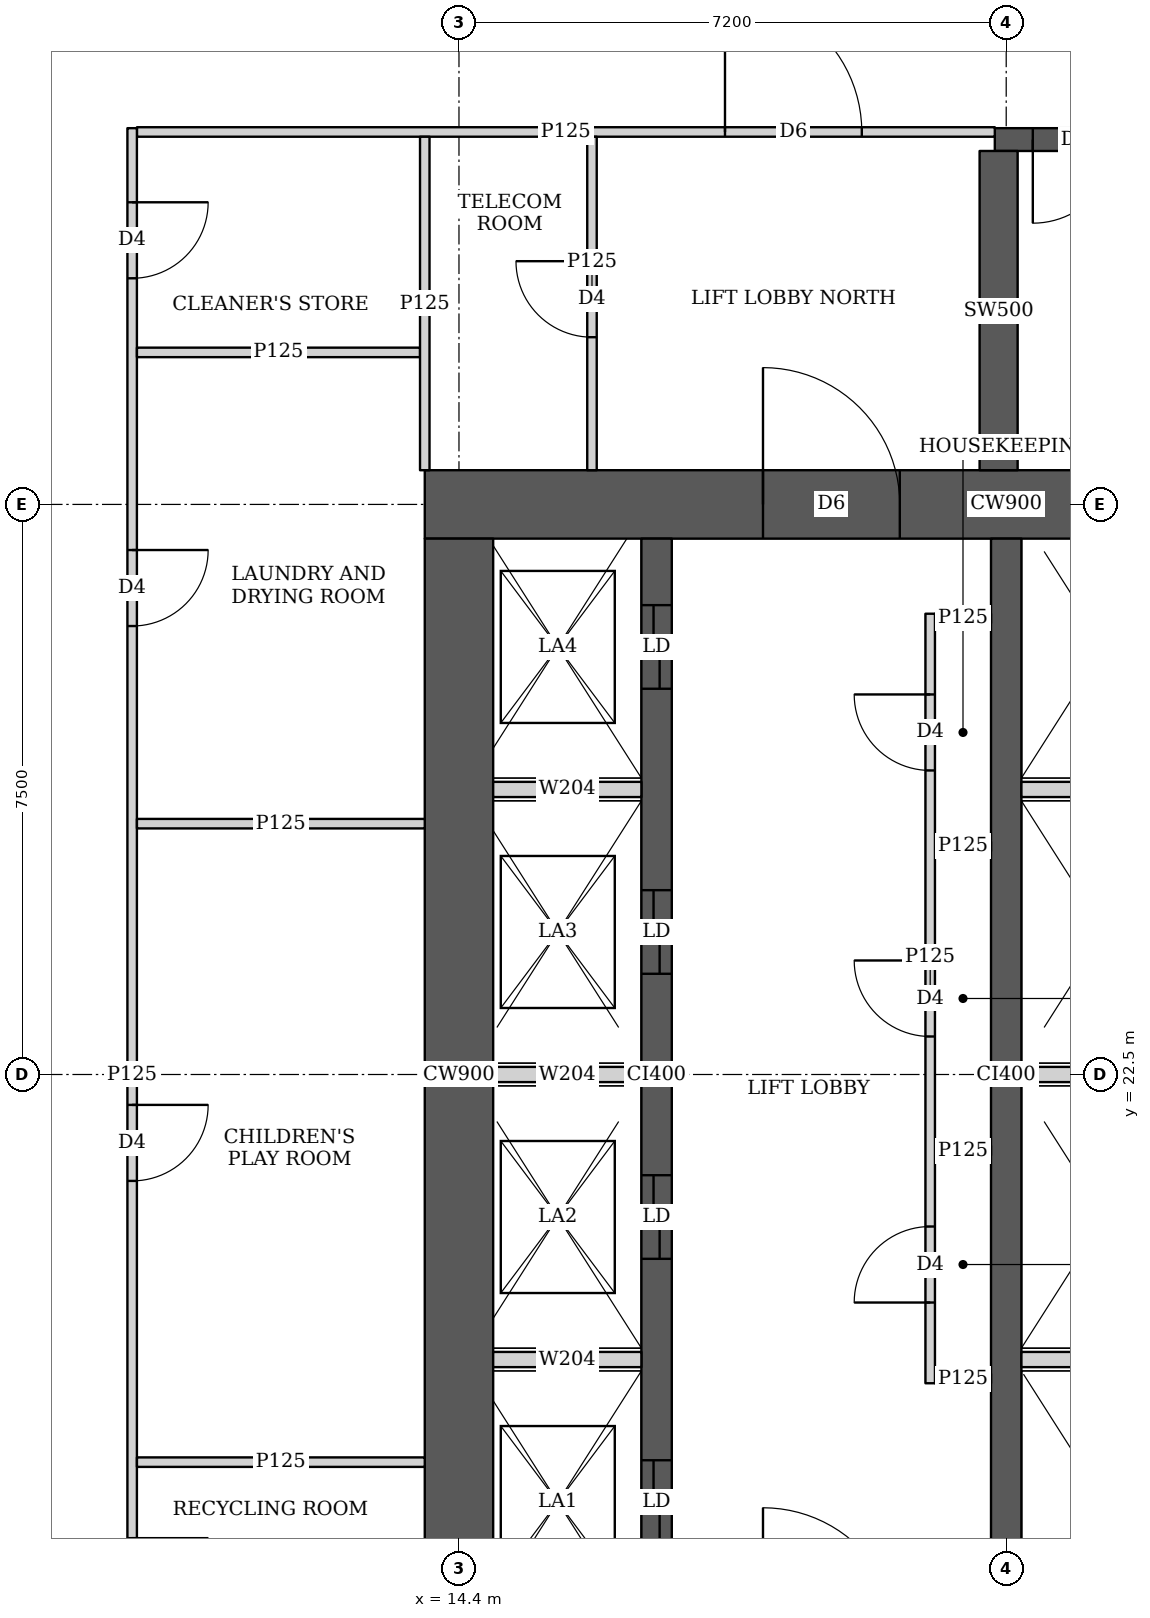
"""IFC4 building model, lengths in metres.
Left out: names, types, materials, properties, quantities, classifications, styles, units other than length and angle.
Written with IfcOpenShell. Run it as: python <this file> out.ifc"""

import sys

from ifc_helpers import new_model, si_unit, direction, frame, frame_2d, origin, place, context, subcontext, project, spatial, rectangle, extrude, element, fill, save


model = new_model("IFC4")
c1 = context("Model", 3, precision=1e-05, world=origin(), true_north=direction((0.0, 1.0)))
c2 = subcontext(c1, "Body", "Model", "MODEL_VIEW")
j1 = project(units=[si_unit("LENGTHUNIT", "METRE"), si_unit("PLANEANGLEUNIT", "RADIAN")], contexts=[c1])
p1 = place(None, origin())
s1 = spatial("IfcSite", under=j1, at=p1, CompositionType="ELEMENT")
p2 = place(p1, origin())
s2 = spatial("IfcBuilding", under=s1, at=p2, CompositionType="ELEMENT")
p3 = place(p2, frame((0.0, 0.0, 53.75)))
s3 = spatial("IfcBuildingStorey", under=s2, at=p3, CompositionType="ELEMENT", Elevation=53.75)
p4 = place(p3, frame((13.95, 30.0, 0.0), z_axis=(0.0, 0.0, 1.0), x_axis=(1.0, 0.0, 0.0)))
e1 = element("IfcWall", 1, at=p4, inside=s3, PredefinedType="SHEAR", context=c2, shape_type="SweptSolid", body=[
    extrude(rectangle(XDim=15.3, YDim=0.9, at=frame_2d((7.65, 0.0))), origin(), (0.0, 0.0, 1.0), 3.75),
])
p5 = place(p4, frame((4.45, 0.0, 0.0)))
e2 = element("IfcOpeningElement", 2, at=p5, cuts=e1, PredefinedType="OPENING", context=c2, shape_type="SweptSolid", body=[
    extrude(rectangle(XDim=1.8, YDim=2.1, at=frame_2d((0.9, 1.05))), frame((0.0, 0.46, 0.0), z_axis=(0.0, -1.0, 0.0), x_axis=(1.0, 0.0, 0.0)), (0.0, 0.0, 1.0), 0.92),
])
p6 = place(p4, frame((10.7, 0.0, 0.0)))
e3 = element("IfcOpeningElement", 3, at=p6, cuts=e1, PredefinedType="OPENING", context=c2, shape_type="SweptSolid", body=[
    extrude(rectangle(XDim=1.1, YDim=2.1, at=frame_2d((0.55, 1.05))), frame((0.0, 0.46, 0.0), z_axis=(0.0, -1.0, 0.0), x_axis=(1.0, 0.0, 0.0)), (0.0, 0.0, 1.0), 0.92),
])
p7 = place(p3, frame((14.4, 15.45, 0.0), z_axis=(0.0, 0.0, 1.0), x_axis=(0.0, 1.0, 0.0)))
e4 = element("IfcWall", 4, at=p7, inside=s3, PredefinedType="SHEAR", context=c2, shape_type="SweptSolid", body=[
    extrude(rectangle(XDim=14.1, YDim=0.9, at=frame_2d((7.05, 0.0))), origin(), (0.0, 0.0, 1.0), 3.75),
])
p8 = place(p3, frame((17.0, 15.45, 0.0), z_axis=(0.0, 0.0, 1.0), x_axis=(0.0, 1.0, 0.0)))
e5 = element("IfcWall", 5, at=p8, inside=s3, PredefinedType="SHEAR", context=c2, shape_type="SweptSolid", body=[
    extrude(rectangle(XDim=14.1, YDim=0.4, at=frame_2d((7.05, 0.0))), origin(), (0.0, 0.0, 1.0), 3.75),
])
p9 = place(p8, frame((0.875, 0.0, 0.0)))
e6 = element("IfcOpeningElement", 6, at=p9, cuts=e5, PredefinedType="OPENING", context=c2, shape_type="SweptSolid", body=[
    extrude(rectangle(XDim=1.1, YDim=2.1, at=frame_2d((0.55, 1.05))), frame((0.0, 0.21, 0.0), z_axis=(0.0, -1.0, 0.0), x_axis=(1.0, 0.0, 0.0)), (0.0, 0.0, 1.0), 0.42),
])
p10 = place(p8, frame((4.625, 0.0, 0.0)))
e7 = element("IfcOpeningElement", 7, at=p10, cuts=e5, PredefinedType="OPENING", context=c2, shape_type="SweptSolid", body=[
    extrude(rectangle(XDim=1.1, YDim=2.1, at=frame_2d((0.55, 1.05))), frame((0.0, 0.21, 0.0), z_axis=(0.0, -1.0, 0.0), x_axis=(1.0, 0.0, 0.0)), (0.0, 0.0, 1.0), 0.42),
])
p11 = place(p8, frame((8.375, 0.0, 0.0)))
e8 = element("IfcOpeningElement", 8, at=p11, cuts=e5, PredefinedType="OPENING", context=c2, shape_type="SweptSolid", body=[
    extrude(rectangle(XDim=1.1, YDim=2.1, at=frame_2d((0.55, 1.05))), frame((0.0, 0.21, 0.0), z_axis=(0.0, -1.0, 0.0), x_axis=(1.0, 0.0, 0.0)), (0.0, 0.0, 1.0), 0.42),
])
p12 = place(p8, frame((12.125, 0.0, 0.0)))
e9 = element("IfcOpeningElement", 9, at=p12, cuts=e5, PredefinedType="OPENING", context=c2, shape_type="SweptSolid", body=[
    extrude(rectangle(XDim=1.1, YDim=2.1, at=frame_2d((0.55, 1.05))), frame((0.0, 0.21, 0.0), z_axis=(0.0, -1.0, 0.0), x_axis=(1.0, 0.0, 0.0)), (0.0, 0.0, 1.0), 0.42),
])
p13 = place(p3, frame((21.6, 15.45, 0.0), z_axis=(0.0, 0.0, 1.0), x_axis=(0.0, 1.0, 0.0)))
e10 = element("IfcWall", 10, at=p13, inside=s3, PredefinedType="SHEAR", context=c2, shape_type="SweptSolid", body=[
    extrude(rectangle(XDim=14.1, YDim=0.4, at=frame_2d((7.05, 0.0))), origin(), (0.0, 0.0, 1.0), 3.75),
])
p14 = place(p3, frame((21.45, 34.8, 0.0), z_axis=(0.0, 0.0, 1.0), x_axis=(1.0, 0.0, 0.0)))
e11 = element("IfcWall", 11, at=p14, inside=s3, PredefinedType="SHEAR", context=c2, shape_type="SweptSolid", body=[
    extrude(rectangle(XDim=7.5, YDim=0.3, at=frame_2d((3.75, 0.0))), origin(), (0.0, 0.0, 1.0), 3.75),
])
p15 = place(p14, frame((0.5, 0.0, 0.0)))
e12 = element("IfcOpeningElement", 12, at=p15, cuts=e11, PredefinedType="OPENING", context=c2, shape_type="SweptSolid", body=[
    extrude(rectangle(XDim=1.1, YDim=2.1, at=frame_2d((0.55, 1.05))), frame((0.0, 0.16, 0.0), z_axis=(0.0, -1.0, 0.0), x_axis=(1.0, 0.0, 0.0)), (0.0, 0.0, 1.0), 0.32),
])
p16 = place(p3, frame((21.5, 30.45, 0.0), z_axis=(0.0, 0.0, 1.0), x_axis=(0.0, 1.0, 0.0)))
e13 = element("IfcWall", 13, at=p16, inside=s3, PredefinedType="SHEAR", context=c2, shape_type="SweptSolid", body=[
    extrude(rectangle(XDim=4.2, YDim=0.5, at=frame_2d((2.1, 0.0))), origin(), (0.0, 0.0, 1.0), 3.75),
])
p17 = place(p3, frame((10.1, 10.05, 0.0), z_axis=(0.0, 0.0, 1.0), x_axis=(0.0, 1.0, 0.0)))
e14 = element("IfcWall", 14, at=p17, inside=s3, PredefinedType="PARTITIONING", context=c2, shape_type="SweptSolid", body=[
    extrude(rectangle(XDim=24.9, YDim=0.125, at=frame_2d((12.45, 0.0))), origin(), (0.0, 0.0, 1.0), 3.5),
])
p18 = place(p17, frame((1.675, 0.0, 0.0)))
e15 = element("IfcOpeningElement", 15, at=p18, cuts=e14, PredefinedType="OPENING", context=c2, shape_type="SweptSolid", body=[
    extrude(rectangle(XDim=1.0, YDim=2.1, at=frame_2d((0.5, 1.05))), frame((0.0, 0.073, 0.0), z_axis=(0.0, -1.0, 0.0), x_axis=(1.0, 0.0, 0.0)), (0.0, 0.0, 1.0), 0.145),
])
p19 = place(p17, frame((5.35, 0.0, 0.0)))
e16 = element("IfcOpeningElement", 16, at=p19, cuts=e14, PredefinedType="OPENING", context=c2, shape_type="SweptSolid", body=[
    extrude(rectangle(XDim=1.0, YDim=2.1, at=frame_2d((0.5, 1.05))), frame((0.0, 0.073, 0.0), z_axis=(0.0, -1.0, 0.0), x_axis=(1.0, 0.0, 0.0)), (0.0, 0.0, 1.0), 0.145),
])
p20 = place(p17, frame((11.05, 0.0, 0.0)))
e17 = element("IfcOpeningElement", 17, at=p20, cuts=e14, PredefinedType="OPENING", context=c2, shape_type="SweptSolid", body=[
    extrude(rectangle(XDim=1.0, YDim=2.1, at=frame_2d((0.5, 1.05))), frame((0.0, 0.073, 0.0), z_axis=(0.0, -1.0, 0.0), x_axis=(1.0, 0.0, 0.0)), (0.0, 0.0, 1.0), 0.145),
])
p21 = place(p17, frame((18.35, 0.0, 0.0)))
e18 = element("IfcOpeningElement", 18, at=p21, cuts=e14, PredefinedType="OPENING", context=c2, shape_type="SweptSolid", body=[
    extrude(rectangle(XDim=1.0, YDim=2.1, at=frame_2d((0.5, 1.05))), frame((0.0, 0.073, 0.0), z_axis=(0.0, -1.0, 0.0), x_axis=(1.0, 0.0, 0.0)), (0.0, 0.0, 1.0), 0.145),
])
p22 = place(p17, frame((22.925, 0.0, 0.0)))
e19 = element("IfcOpeningElement", 19, at=p22, cuts=e14, PredefinedType="OPENING", context=c2, shape_type="SweptSolid", body=[
    extrude(rectangle(XDim=1.0, YDim=2.1, at=frame_2d((0.5, 1.05))), frame((0.0, 0.073, 0.0), z_axis=(0.0, -1.0, 0.0), x_axis=(1.0, 0.0, 0.0)), (0.0, 0.0, 1.0), 0.145),
])
for number, where, z_axis, x_axis in (
    (20, (10.163, 17.4, 0.0), (0.0, 0.0, 1.0), (1.0, 0.0, 0.0)),
    (21, (10.163, 25.8, 0.0), (0.0, 0.0, 1.0), (1.0, 0.0, 0.0)),
):
    element("IfcWall", number, at=place(p3, frame(where, z_axis=z_axis, x_axis=x_axis)), inside=s3, PredefinedType="PARTITIONING", context=c2, shape_type="SweptSolid", body=[
        extrude(rectangle(XDim=3.787, YDim=0.125, at=frame_2d((1.894, 0.0))), origin(), (0.0, 0.0, 1.0), 3.5),
    ])
p23 = place(p3, frame((10.163, 32.0, 0.0), z_axis=(0.0, 0.0, 1.0), x_axis=(1.0, 0.0, 0.0)))
e22 = element("IfcWall", 22, at=p23, inside=s3, PredefinedType="PARTITIONING", context=c2, shape_type="SweptSolid", body=[
    extrude(rectangle(XDim=3.725, YDim=0.125, at=frame_2d((1.862, 0.0))), origin(), (0.0, 0.0, 1.0), 3.5),
])
p24 = place(p3, frame((13.95, 30.45, 0.0), z_axis=(0.0, 0.0, 1.0), x_axis=(0.0, 1.0, 0.0)))
e23 = element("IfcWall", 23, at=p24, inside=s3, PredefinedType="PARTITIONING", context=c2, shape_type="SweptSolid", body=[
    extrude(rectangle(XDim=4.387, YDim=0.125, at=frame_2d((2.193, 0.0))), origin(), (0.0, 0.0, 1.0), 3.5),
])
p25 = place(p3, frame((10.163, 34.9, 0.0), z_axis=(0.0, 0.0, 1.0), x_axis=(1.0, 0.0, 0.0)))
e24 = element("IfcWall", 24, at=p25, inside=s3, PredefinedType="PARTITIONING", context=c2, shape_type="SweptSolid", body=[
    extrude(rectangle(XDim=11.287, YDim=0.125, at=frame_2d((5.644, 0.0))), origin(), (0.0, 0.0, 1.0), 3.5),
])
p26 = place(p25, frame((7.737, 0.0, 0.0)))
e25 = element("IfcOpeningElement", 25, at=p26, cuts=e24, PredefinedType="OPENING", context=c2, shape_type="SweptSolid", body=[
    extrude(rectangle(XDim=1.8, YDim=2.1, at=frame_2d((0.9, 1.05))), frame((0.0, 0.073, 0.0), z_axis=(0.0, -1.0, 0.0), x_axis=(1.0, 0.0, 0.0)), (0.0, 0.0, 1.0), 0.145),
])
p27 = place(p3, frame((16.15, 30.45, 0.0), z_axis=(0.0, 0.0, 1.0), x_axis=(0.0, 1.0, 0.0)))
e26 = element("IfcWall", 26, at=p27, inside=s3, PredefinedType="PARTITIONING", context=c2, shape_type="SweptSolid", body=[
    extrude(rectangle(XDim=4.387, YDim=0.125, at=frame_2d((2.193, 0.0))), origin(), (0.0, 0.0, 1.0), 3.5),
])
p28 = place(p27, frame((1.75, 0.0, 0.0)))
e27 = element("IfcOpeningElement", 27, at=p28, cuts=e26, PredefinedType="OPENING", context=c2, shape_type="SweptSolid", body=[
    extrude(rectangle(XDim=1.0, YDim=2.1, at=frame_2d((0.5, 1.05))), frame((0.0, 0.073, 0.0), z_axis=(0.0, -1.0, 0.0), x_axis=(1.0, 0.0, 0.0)), (0.0, 0.0, 1.0), 0.145),
])
p29 = place(p3, frame((20.6, 18.438, 0.0), z_axis=(0.0, 0.0, 1.0), x_axis=(0.0, 1.0, 0.0)))
e28 = element("IfcWall", 28, at=p29, inside=s3, PredefinedType="PARTITIONING", context=c2, shape_type="SweptSolid", body=[
    extrude(rectangle(XDim=10.124, YDim=0.125, at=frame_2d((5.062, 0.0))), origin(), (0.0, 0.0, 1.0), 3.5),
])
p30 = place(p29, frame((1.062, 0.0, 0.0)))
e29 = element("IfcOpeningElement", 29, at=p30, cuts=e28, PredefinedType="OPENING", context=c2, shape_type="SweptSolid", body=[
    extrude(rectangle(XDim=1.0, YDim=2.1, at=frame_2d((0.5, 1.05))), frame((0.0, 0.073, 0.0), z_axis=(0.0, -1.0, 0.0), x_axis=(1.0, 0.0, 0.0)), (0.0, 0.0, 1.0), 0.145),
])
p31 = place(p29, frame((4.562, 0.0, 0.0)))
e30 = element("IfcOpeningElement", 30, at=p31, cuts=e28, PredefinedType="OPENING", context=c2, shape_type="SweptSolid", body=[
    extrude(rectangle(XDim=1.0, YDim=2.1, at=frame_2d((0.5, 1.05))), frame((0.0, 0.073, 0.0), z_axis=(0.0, -1.0, 0.0), x_axis=(1.0, 0.0, 0.0)), (0.0, 0.0, 1.0), 0.145),
])
p32 = place(p29, frame((8.062, 0.0, 0.0)))
e31 = element("IfcOpeningElement", 31, at=p32, cuts=e28, PredefinedType="OPENING", context=c2, shape_type="SweptSolid", body=[
    extrude(rectangle(XDim=1.0, YDim=2.1, at=frame_2d((0.5, 1.05))), frame((0.0, 0.073, 0.0), z_axis=(0.0, -1.0, 0.0), x_axis=(1.0, 0.0, 0.0)), (0.0, 0.0, 1.0), 0.145),
])
for number, where, z_axis, x_axis in (
    (32, (20.663, 18.5, 0.0), (0.0, 0.0, 1.0), (1.0, 0.0, 0.0)),
    (33, (20.663, 28.5, 0.0), (0.0, 0.0, 1.0), (1.0, 0.0, 0.0)),
    (34, (20.663, 21.5, 0.0), (0.0, 0.0, 1.0), (1.0, 0.0, 0.0)),
    (35, (20.663, 25.5, 0.0), (0.0, 0.0, 1.0), (1.0, 0.0, 0.0)),
):
    element("IfcWall", number, at=place(p3, frame(where, z_axis=z_axis, x_axis=x_axis)), inside=s3, PredefinedType="PARTITIONING", context=c2, shape_type="SweptSolid", body=[
        extrude(rectangle(XDim=0.737, YDim=0.125, at=frame_2d((0.368, 0.0))), origin(), (0.0, 0.0, 1.0), 3.5),
    ])
p33 = place(p3, frame((14.85, 18.75, 0.0), z_axis=(0.0, 0.0, 1.0), x_axis=(1.0, 0.0, 0.0)))
e36 = element("IfcWall", 36, at=p33, inside=s3, PredefinedType="SOLIDWALL", context=c2, shape_type="SweptSolid", body=[
    extrude(rectangle(XDim=1.95, YDim=0.2, at=frame_2d((0.975, 0.0))), origin(), (0.0, 0.0, 1.0), 3.5),
])
p34 = place(p3, frame((21.8, 18.75, 0.0), z_axis=(0.0, 0.0, 1.0), x_axis=(1.0, 0.0, 0.0)))
e37 = element("IfcWall", 37, at=p34, inside=s3, PredefinedType="SOLIDWALL", context=c2, shape_type="SweptSolid", body=[
    extrude(rectangle(XDim=2.2, YDim=0.2, at=frame_2d((1.1, 0.0))), origin(), (0.0, 0.0, 1.0), 3.5),
])
p35 = place(p3, frame((14.85, 22.5, 0.0), z_axis=(0.0, 0.0, 1.0), x_axis=(1.0, 0.0, 0.0)))
e38 = element("IfcWall", 38, at=p35, inside=s3, PredefinedType="SOLIDWALL", context=c2, shape_type="SweptSolid", body=[
    extrude(rectangle(XDim=1.95, YDim=0.2, at=frame_2d((0.975, 0.0))), origin(), (0.0, 0.0, 1.0), 3.5),
])
p36 = place(p3, frame((21.8, 22.5, 0.0), z_axis=(0.0, 0.0, 1.0), x_axis=(1.0, 0.0, 0.0)))
e39 = element("IfcWall", 39, at=p36, inside=s3, PredefinedType="SOLIDWALL", context=c2, shape_type="SweptSolid", body=[
    extrude(rectangle(XDim=2.2, YDim=0.2, at=frame_2d((1.1, 0.0))), origin(), (0.0, 0.0, 1.0), 3.5),
])
p37 = place(p3, frame((14.85, 26.25, 0.0), z_axis=(0.0, 0.0, 1.0), x_axis=(1.0, 0.0, 0.0)))
e40 = element("IfcWall", 40, at=p37, inside=s3, PredefinedType="SOLIDWALL", context=c2, shape_type="SweptSolid", body=[
    extrude(rectangle(XDim=1.95, YDim=0.2, at=frame_2d((0.975, 0.0))), origin(), (0.0, 0.0, 1.0), 3.5),
])
p38 = place(p3, frame((21.8, 26.25, 0.0), z_axis=(0.0, 0.0, 1.0), x_axis=(1.0, 0.0, 0.0)))
e41 = element("IfcWall", 41, at=p38, inside=s3, PredefinedType="SOLIDWALL", context=c2, shape_type="SweptSolid", body=[
    extrude(rectangle(XDim=2.2, YDim=0.2, at=frame_2d((1.1, 0.0))), origin(), (0.0, 0.0, 1.0), 3.5),
])
p39 = place(p19, origin())
e42 = element("IfcDoor", 42, at=p39, inside=s3, OperationType="SINGLE_SWING_LEFT", PredefinedType="DOOR", context=c2, shape_type="SweptSolid", body=[
    extrude(rectangle(XDim=1.0, YDim=2.1, at=frame_2d((0.5, 1.05))), frame((0.0, 0.025, 0.0), z_axis=(0.0, -1.0, 0.0), x_axis=(1.0, 0.0, 0.0)), (0.0, 0.0, 1.0), 0.05),
])
fill(e16, e42)
p40 = place(p20, origin())
e43 = element("IfcDoor", 43, at=p40, inside=s3, OperationType="SINGLE_SWING_LEFT", PredefinedType="DOOR", context=c2, shape_type="SweptSolid", body=[
    extrude(rectangle(XDim=1.0, YDim=2.1, at=frame_2d((0.5, 1.05))), frame((0.0, 0.025, 0.0), z_axis=(0.0, -1.0, 0.0), x_axis=(1.0, 0.0, 0.0)), (0.0, 0.0, 1.0), 0.05),
])
fill(e17, e43)
p41 = place(p21, origin())
e44 = element("IfcDoor", 44, at=p41, inside=s3, OperationType="SINGLE_SWING_LEFT", PredefinedType="DOOR", context=c2, shape_type="SweptSolid", body=[
    extrude(rectangle(XDim=1.0, YDim=2.1, at=frame_2d((0.5, 1.05))), frame((0.0, 0.025, 0.0), z_axis=(0.0, -1.0, 0.0), x_axis=(1.0, 0.0, 0.0)), (0.0, 0.0, 1.0), 0.05),
])
fill(e18, e44)
p42 = place(p22, origin())
e45 = element("IfcDoor", 45, at=p42, inside=s3, OperationType="SINGLE_SWING_LEFT", PredefinedType="DOOR", context=c2, shape_type="SweptSolid", body=[
    extrude(rectangle(XDim=1.0, YDim=2.1, at=frame_2d((0.5, 1.05))), frame((0.0, 0.025, 0.0), z_axis=(0.0, -1.0, 0.0), x_axis=(1.0, 0.0, 0.0)), (0.0, 0.0, 1.0), 0.05),
])
fill(e19, e45)
p43 = place(p28, origin())
e46 = element("IfcDoor", 46, at=p43, inside=s3, OperationType="SINGLE_SWING_RIGHT", PredefinedType="DOOR", context=c2, shape_type="SweptSolid", body=[
    extrude(rectangle(XDim=1.0, YDim=2.1, at=frame_2d((0.5, 1.05))), frame((0.0, 0.025, 0.0), z_axis=(0.0, -1.0, 0.0), x_axis=(1.0, 0.0, 0.0)), (0.0, 0.0, 1.0), 0.05),
])
fill(e27, e46)
p44 = place(p26, origin())
e47 = element("IfcDoor", 47, at=p44, inside=s3, OperationType="DOUBLE_DOOR_SINGLE_SWING", PredefinedType="DOOR", context=c2, shape_type="SweptSolid", body=[
    extrude(rectangle(XDim=1.8, YDim=2.1, at=frame_2d((0.9, 1.05))), frame((0.0, 0.025, 0.0), z_axis=(0.0, -1.0, 0.0), x_axis=(1.0, 0.0, 0.0)), (0.0, 0.0, 1.0), 0.05),
])
fill(e25, e47)
p45 = place(p30, origin())
e48 = element("IfcDoor", 48, at=p45, inside=s3, OperationType="SINGLE_SWING_LEFT", PredefinedType="DOOR", context=c2, shape_type="SweptSolid", body=[
    extrude(rectangle(XDim=1.0, YDim=2.1, at=frame_2d((0.5, 1.05))), frame((0.0, 0.025, 0.0), z_axis=(0.0, -1.0, 0.0), x_axis=(1.0, 0.0, 0.0)), (0.0, 0.0, 1.0), 0.05),
])
fill(e29, e48)
p46 = place(p31, origin())
e49 = element("IfcDoor", 49, at=p46, inside=s3, OperationType="SINGLE_SWING_RIGHT", PredefinedType="DOOR", context=c2, shape_type="SweptSolid", body=[
    extrude(rectangle(XDim=1.0, YDim=2.1, at=frame_2d((0.5, 1.05))), frame((0.0, 0.025, 0.0), z_axis=(0.0, -1.0, 0.0), x_axis=(1.0, 0.0, 0.0)), (0.0, 0.0, 1.0), 0.05),
])
fill(e30, e49)
p47 = place(p32, origin())
e50 = element("IfcDoor", 50, at=p47, inside=s3, OperationType="SINGLE_SWING_RIGHT", PredefinedType="DOOR", context=c2, shape_type="SweptSolid", body=[
    extrude(rectangle(XDim=1.0, YDim=2.1, at=frame_2d((0.5, 1.05))), frame((0.0, 0.025, 0.0), z_axis=(0.0, -1.0, 0.0), x_axis=(1.0, 0.0, 0.0)), (0.0, 0.0, 1.0), 0.05),
])
fill(e31, e50)
p48 = place(p5, origin())
e51 = element("IfcDoor", 51, at=p48, inside=s3, OperationType="DOUBLE_DOOR_SINGLE_SWING", PredefinedType="DOOR", context=c2, shape_type="SweptSolid", body=[
    extrude(rectangle(XDim=1.8, YDim=2.1, at=frame_2d((0.9, 1.05))), frame((0.0, 0.025, 0.0), z_axis=(0.0, -1.0, 0.0), x_axis=(1.0, 0.0, 0.0)), (0.0, 0.0, 1.0), 0.05),
])
fill(e2, e51)
p49 = place(p9, origin())
e52 = element("IfcDoor", 52, at=p49, inside=s3, OperationType="DOUBLE_DOOR_SLIDING", PredefinedType="DOOR", context=c2, shape_type="SweptSolid", body=[
    extrude(rectangle(XDim=1.1, YDim=2.1, at=frame_2d((0.55, 1.05))), frame((0.0, 0.025, 0.0), z_axis=(0.0, -1.0, 0.0), x_axis=(1.0, 0.0, 0.0)), (0.0, 0.0, 1.0), 0.05),
])
fill(e6, e52)
p50 = place(p10, origin())
e53 = element("IfcDoor", 53, at=p50, inside=s3, OperationType="DOUBLE_DOOR_SLIDING", PredefinedType="DOOR", context=c2, shape_type="SweptSolid", body=[
    extrude(rectangle(XDim=1.1, YDim=2.1, at=frame_2d((0.55, 1.05))), frame((0.0, 0.025, 0.0), z_axis=(0.0, -1.0, 0.0), x_axis=(1.0, 0.0, 0.0)), (0.0, 0.0, 1.0), 0.05),
])
fill(e7, e53)
p51 = place(p11, origin())
e54 = element("IfcDoor", 54, at=p51, inside=s3, OperationType="DOUBLE_DOOR_SLIDING", PredefinedType="DOOR", context=c2, shape_type="SweptSolid", body=[
    extrude(rectangle(XDim=1.1, YDim=2.1, at=frame_2d((0.55, 1.05))), frame((0.0, 0.025, 0.0), z_axis=(0.0, -1.0, 0.0), x_axis=(1.0, 0.0, 0.0)), (0.0, 0.0, 1.0), 0.05),
])
fill(e8, e54)
p52 = place(p12, origin())
e55 = element("IfcDoor", 55, at=p52, inside=s3, OperationType="DOUBLE_DOOR_SLIDING", PredefinedType="DOOR", context=c2, shape_type="SweptSolid", body=[
    extrude(rectangle(XDim=1.1, YDim=2.1, at=frame_2d((0.55, 1.05))), frame((0.0, 0.025, 0.0), z_axis=(0.0, -1.0, 0.0), x_axis=(1.0, 0.0, 0.0)), (0.0, 0.0, 1.0), 0.05),
])
fill(e9, e55)
p53 = place(p15, origin())
e56 = element("IfcDoor", 56, at=p53, inside=s3, OperationType="SINGLE_SWING_RIGHT", PredefinedType="DOOR", context=c2, shape_type="SweptSolid", body=[
    extrude(rectangle(XDim=1.1, YDim=2.1, at=frame_2d((0.55, 1.05))), frame((0.0, 0.025, 0.0), z_axis=(0.0, -1.0, 0.0), x_axis=(1.0, 0.0, 0.0)), (0.0, 0.0, 1.0), 0.05),
])
fill(e12, e56)
save(model, sys.argv[1])
